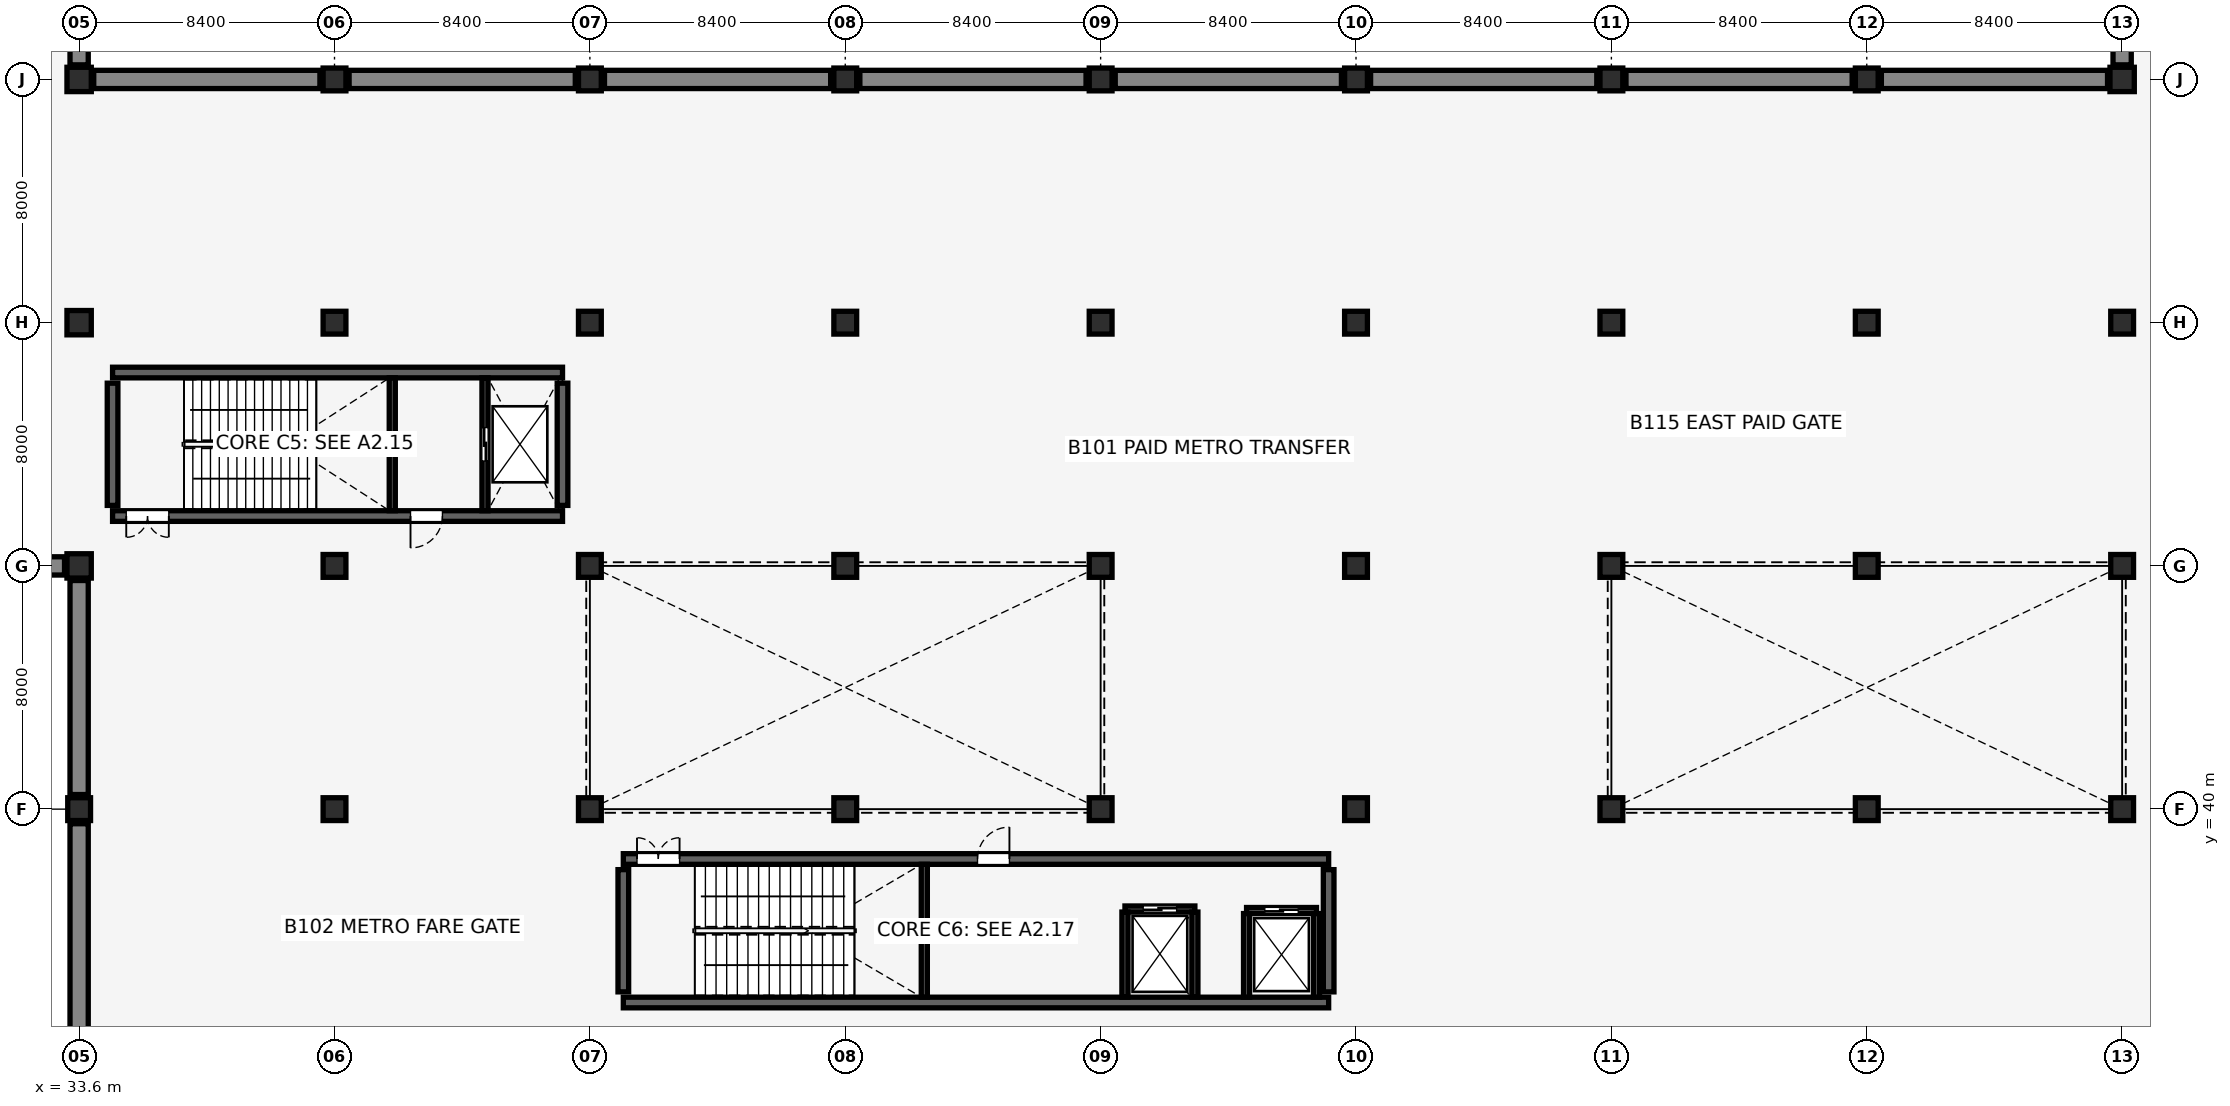
"""IFC4 building model, lengths in metres.
Left out: names, types, materials, properties, quantities, classifications, styles, units other than length and angle.
Written with IfcOpenShell. Run it as: python <this file> out.ifc"""

import sys

from ifc_helpers import new_model, si_unit, direction, frame, frame_2d, origin, origin_2d, place, context, subcontext, project, spatial, rectangle, extrude, element, fill, save


model = new_model("IFC4")
c1 = context("Model", 3, precision=1e-05, world=origin(), true_north=direction((0.0, 1.0)))
c2 = subcontext(c1, "Body", "Model", "MODEL_VIEW")
j1 = project(units=[si_unit("LENGTHUNIT", "METRE"), si_unit("PLANEANGLEUNIT", "RADIAN")], contexts=[c1])
p1 = place(None, origin())
s1 = spatial("IfcSite", under=j1, at=p1, CompositionType="ELEMENT")
p2 = place(p1, origin())
s2 = spatial("IfcBuilding", under=s1, at=p2, CompositionType="ELEMENT")
p3 = place(p2, frame((0.0, 0.0, -5.44)))
s3 = spatial("IfcBuildingStorey", under=s2, at=p3, CompositionType="ELEMENT", Elevation=-5.44)
for number, where, z_axis, x_axis in (
    (1, (33.6, 32.48, 0.0), (0.0, 0.0, 1.0), (0.0, 1.0, 0.0)),
    (2, (33.6, 40.48, 0.0), (0.0, 0.0, 1.0), (0.0, 1.0, 0.0)),
):
    element("IfcWall", number, at=place(p3, frame(where, z_axis=z_axis, x_axis=x_axis)), inside=s3, PredefinedType="SOLIDWALL", context=c2, shape_type="SweptSolid", body=[
        extrude(rectangle(XDim=7.04, YDim=0.6, at=frame_2d((3.52, 0.0))), origin(), (0.0, 0.0, 1.0), 5.02),
    ])
p4 = place(p3, frame((25.68, 48.0, 0.0), z_axis=(0.0, 0.0, 1.0), x_axis=(1.0, 0.0, 0.0)))
e3 = element("IfcWall", 3, at=p4, inside=s3, PredefinedType="SOLIDWALL", context=c2, shape_type="SweptSolid", body=[
    extrude(rectangle(XDim=7.44, YDim=0.6, at=frame_2d((3.72, 0.0))), origin(), (0.0, 0.0, 1.0), 5.02),
])
p5 = place(p3, frame((33.6, 64.48, 0.0), z_axis=(0.0, 0.0, 1.0), x_axis=(0.0, 1.0, 0.0)))
e4 = element("IfcWall", 4, at=p5, inside=s3, PredefinedType="SOLIDWALL", context=c2, shape_type="SweptSolid", body=[
    extrude(rectangle(XDim=7.04, YDim=0.6, at=frame_2d((3.52, 0.0))), origin(), (0.0, 0.0, 1.0), 5.02),
])
for number, where, z_axis, x_axis in (
    (5, (34.08, 64.0, 0.0), (0.0, 0.0, 1.0), (1.0, 0.0, 0.0)),
    (6, (42.48, 64.0, 0.0), (0.0, 0.0, 1.0), (1.0, 0.0, 0.0)),
):
    element("IfcWall", number, at=place(p3, frame(where, z_axis=z_axis, x_axis=x_axis)), inside=s3, PredefinedType="SOLIDWALL", context=c2, shape_type="SweptSolid", body=[
        extrude(rectangle(XDim=7.44, YDim=0.6, at=frame_2d((3.72, 0.0))), origin(), (0.0, 0.0, 1.0), 5.02),
    ])
p6 = place(p3, frame((50.88, 64.0, 0.0), z_axis=(0.0, 0.0, 1.0), x_axis=(1.0, 0.0, 0.0)))
e7 = element("IfcWall", 7, at=p6, inside=s3, PredefinedType="SOLIDWALL", context=c2, shape_type="SweptSolid", body=[
    extrude(rectangle(XDim=7.44, YDim=0.6, at=frame_2d((3.72, 0.0))), origin(), (0.0, 0.0, 1.0), 5.02),
])
p7 = place(p3, frame((59.28, 64.0, 0.0), z_axis=(0.0, 0.0, 1.0), x_axis=(1.0, 0.0, 0.0)))
e8 = element("IfcWall", 8, at=p7, inside=s3, PredefinedType="SOLIDWALL", context=c2, shape_type="SweptSolid", body=[
    extrude(rectangle(XDim=7.44, YDim=0.6, at=frame_2d((3.72, 0.0))), origin(), (0.0, 0.0, 1.0), 5.02),
])
p8 = place(p3, frame((67.68, 64.0, 0.0), z_axis=(0.0, 0.0, 1.0), x_axis=(1.0, 0.0, 0.0)))
e9 = element("IfcWall", 9, at=p8, inside=s3, PredefinedType="SOLIDWALL", context=c2, shape_type="SweptSolid", body=[
    extrude(rectangle(XDim=7.44, YDim=0.6, at=frame_2d((3.72, 0.0))), origin(), (0.0, 0.0, 1.0), 5.02),
])
for number, where, z_axis, x_axis in (
    (10, (76.08, 64.0, 0.0), (0.0, 0.0, 1.0), (1.0, 0.0, 0.0)),
    (11, (84.48, 64.0, 0.0), (0.0, 0.0, 1.0), (1.0, 0.0, 0.0)),
):
    element("IfcWall", number, at=place(p3, frame(where, z_axis=z_axis, x_axis=x_axis)), inside=s3, PredefinedType="SOLIDWALL", context=c2, shape_type="SweptSolid", body=[
        extrude(rectangle(XDim=7.44, YDim=0.6, at=frame_2d((3.72, 0.0))), origin(), (0.0, 0.0, 1.0), 5.02),
    ])
p9 = place(p3, frame((92.88, 64.0, 0.0), z_axis=(0.0, 0.0, 1.0), x_axis=(1.0, 0.0, 0.0)))
e12 = element("IfcWall", 12, at=p9, inside=s3, PredefinedType="SOLIDWALL", context=c2, shape_type="SweptSolid", body=[
    extrude(rectangle(XDim=7.44, YDim=0.6, at=frame_2d((3.72, 0.0))), origin(), (0.0, 0.0, 1.0), 5.02),
])
p10 = place(p3, frame((100.8, 64.48, 0.0), z_axis=(0.0, 0.0, 1.0), x_axis=(0.0, 1.0, 0.0)))
e13 = element("IfcWall", 13, at=p10, inside=s3, PredefinedType="SOLIDWALL", context=c2, shape_type="SweptSolid", body=[
    extrude(rectangle(XDim=7.04, YDim=0.6, at=frame_2d((3.52, 0.0))), origin(), (0.0, 0.0, 1.0), 5.02),
])
p11 = place(p3, frame((34.7, 49.64, 0.0), z_axis=(0.0, 0.0, 1.0), x_axis=(1.0, 0.0, 0.0)))
e14 = element("IfcWall", 14, at=p11, inside=s3, PredefinedType="SHEAR", context=c2, shape_type="SweptSolid", body=[
    extrude(rectangle(XDim=14.8, YDim=0.35, at=frame_2d((7.4, 0.0))), origin(), (0.0, 0.0, 1.0), 5.02),
])
p12 = place(p11, frame((1.85, 0.0, 0.0), z_axis=(0.0, 0.0, 1.0), x_axis=(-1.0, 0.0, 0.0)))
e15 = element("IfcOpeningElement", 15, at=p12, cuts=e14, PredefinedType="OPENING", context=c2, shape_type="SweptSolid", body=[
    extrude(rectangle(XDim=1.4, YDim=2.15, at=frame_2d((0.7, 1.075))), frame((0.0, 0.185, 0.0), z_axis=(0.0, -1.0, 0.0), x_axis=(1.0, 0.0, 0.0)), (0.0, 0.0, 1.0), 0.37),
])
p13 = place(p11, frame((10.85, 0.0, 0.0), z_axis=(0.0, 0.0, 1.0), x_axis=(-1.0, 0.0, 0.0)))
e16 = element("IfcOpeningElement", 16, at=p13, cuts=e14, PredefinedType="OPENING", context=c2, shape_type="SweptSolid", body=[
    extrude(rectangle(XDim=1.05, YDim=2.15, at=frame_2d((0.525, 1.075))), frame((0.0, 0.185, 0.0), z_axis=(0.0, -1.0, 0.0), x_axis=(1.0, 0.0, 0.0)), (0.0, 0.0, 1.0), 0.37),
])
p14 = place(p3, frame((34.7, 54.36, 0.0), z_axis=(0.0, 0.0, 1.0), x_axis=(1.0, 0.0, 0.0)))
e17 = element("IfcWall", 17, at=p14, inside=s3, PredefinedType="SHEAR", context=c2, shape_type="SweptSolid", body=[
    extrude(rectangle(XDim=14.8, YDim=0.35, at=frame_2d((7.4, 0.0))), origin(), (0.0, 0.0, 1.0), 5.02),
])
for number, where, z_axis, x_axis in (
    (18, (34.7, 49.99, 0.0), (0.0, 0.0, 1.0), (0.0, 1.0, 0.0)),
    (19, (49.5, 49.99, 0.0), (0.0, 0.0, 1.0), (0.0, 1.0, 0.0)),
):
    element("IfcWall", number, at=place(p3, frame(where, z_axis=z_axis, x_axis=x_axis)), inside=s3, PredefinedType="SHEAR", context=c2, shape_type="SweptSolid", body=[
        extrude(rectangle(XDim=4.02, YDim=0.35, at=frame_2d((2.01, 0.0))), origin(), (0.0, 0.0, 1.0), 5.02),
    ])
p15 = place(p3, frame((51.5, 33.64, 0.0), z_axis=(0.0, 0.0, 1.0), x_axis=(1.0, 0.0, 0.0)))
e20 = element("IfcWall", 20, at=p15, inside=s3, PredefinedType="SHEAR", context=c2, shape_type="SweptSolid", body=[
    extrude(rectangle(XDim=23.2, YDim=0.35, at=frame_2d((11.6, 0.0))), origin(), (0.0, 0.0, 1.0), 5.02),
])
p16 = place(p3, frame((51.5, 38.36, 0.0), z_axis=(0.0, 0.0, 1.0), x_axis=(1.0, 0.0, 0.0)))
e21 = element("IfcWall", 21, at=p16, inside=s3, PredefinedType="SHEAR", context=c2, shape_type="SweptSolid", body=[
    extrude(rectangle(XDim=23.2, YDim=0.35, at=frame_2d((11.6, 0.0))), origin(), (0.0, 0.0, 1.0), 5.02),
])
p17 = place(p16, frame((0.45, 0.0, 0.0), z_axis=(0.0, 0.0, 1.0), x_axis=(1.0, 0.0, 0.0)))
e22 = element("IfcOpeningElement", 22, at=p17, cuts=e21, PredefinedType="OPENING", context=c2, shape_type="SweptSolid", body=[
    extrude(rectangle(XDim=1.4, YDim=2.15, at=frame_2d((0.7, 1.075))), frame((0.0, 0.185, 0.0), z_axis=(0.0, -1.0, 0.0), x_axis=(1.0, 0.0, 0.0)), (0.0, 0.0, 1.0), 0.37),
])
p18 = place(p16, frame((11.65, 0.0, 0.0), z_axis=(0.0, 0.0, 1.0), x_axis=(1.0, 0.0, 0.0)))
e23 = element("IfcOpeningElement", 23, at=p18, cuts=e21, PredefinedType="OPENING", context=c2, shape_type="SweptSolid", body=[
    extrude(rectangle(XDim=1.05, YDim=2.15, at=frame_2d((0.525, 1.075))), frame((0.0, 0.185, 0.0), z_axis=(0.0, -1.0, 0.0), x_axis=(1.0, 0.0, 0.0)), (0.0, 0.0, 1.0), 0.37),
])
for number, where, z_axis, x_axis in (
    (24, (51.5, 33.99, 0.0), (0.0, 0.0, 1.0), (0.0, 1.0, 0.0)),
    (25, (74.7, 33.99, 0.0), (0.0, 0.0, 1.0), (0.0, 1.0, 0.0)),
):
    element("IfcWall", number, at=place(p3, frame(where, z_axis=z_axis, x_axis=x_axis)), inside=s3, PredefinedType="SHEAR", context=c2, shape_type="SweptSolid", body=[
        extrude(rectangle(XDim=4.02, YDim=0.35, at=frame_2d((2.01, 0.0))), origin(), (0.0, 0.0, 1.0), 5.02),
    ])
p19 = place(p3, frame((33.6, 40.0, 0.0), z_axis=(0.0, 0.0, 1.0), x_axis=(1.0, 0.0, 0.0)))
e26 = element("IfcColumn", 26, at=p19, inside=s3, PredefinedType="COLUMN", context=c2, shape_type="SweptSolid", body=[
    extrude(rectangle(XDim=0.75, YDim=0.75, at=origin_2d()), origin(), (0.0, 0.0, 1.0), 5.02),
])
for number, where, z_axis, x_axis in (
    (27, (33.6, 48.0, 0.0), (0.0, 0.0, 1.0), (1.0, 0.0, 0.0)),
    (28, (33.6, 56.0, 0.0), (0.0, 0.0, 1.0), (1.0, 0.0, 0.0)),
    (29, (33.6, 64.0, 0.0), (0.0, 0.0, 1.0), (1.0, 0.0, 0.0)),
):
    element("IfcColumn", number, at=place(p3, frame(where, z_axis=z_axis, x_axis=x_axis)), inside=s3, PredefinedType="COLUMN", context=c2, shape_type="SweptSolid", body=[
        extrude(rectangle(XDim=0.8, YDim=0.8, at=origin_2d()), origin(), (0.0, 0.0, 1.0), 5.02),
    ])
for number, where, z_axis, x_axis in (
    (30, (42.0, 40.0, 0.0), (0.0, 0.0, 1.0), (1.0, 0.0, 0.0)),
    (31, (42.0, 48.0, 0.0), (0.0, 0.0, 1.0), (1.0, 0.0, 0.0)),
    (32, (42.0, 56.0, 0.0), (0.0, 0.0, 1.0), (1.0, 0.0, 0.0)),
    (33, (42.0, 64.0, 0.0), (0.0, 0.0, 1.0), (1.0, 0.0, 0.0)),
    (34, (50.4, 40.0, 0.0), (0.0, 0.0, 1.0), (1.0, 0.0, 0.0)),
    (35, (50.4, 48.0, 0.0), (0.0, 0.0, 1.0), (1.0, 0.0, 0.0)),
    (36, (50.4, 56.0, 0.0), (0.0, 0.0, 1.0), (1.0, 0.0, 0.0)),
    (37, (50.4, 64.0, 0.0), (0.0, 0.0, 1.0), (1.0, 0.0, 0.0)),
    (38, (58.8, 40.0, 0.0), (0.0, 0.0, 1.0), (1.0, 0.0, 0.0)),
    (39, (58.8, 48.0, 0.0), (0.0, 0.0, 1.0), (1.0, 0.0, 0.0)),
    (40, (58.8, 56.0, 0.0), (0.0, 0.0, 1.0), (1.0, 0.0, 0.0)),
    (41, (58.8, 64.0, 0.0), (0.0, 0.0, 1.0), (1.0, 0.0, 0.0)),
    (42, (67.2, 40.0, 0.0), (0.0, 0.0, 1.0), (1.0, 0.0, 0.0)),
    (43, (67.2, 48.0, 0.0), (0.0, 0.0, 1.0), (1.0, 0.0, 0.0)),
    (44, (67.2, 56.0, 0.0), (0.0, 0.0, 1.0), (1.0, 0.0, 0.0)),
    (45, (67.2, 64.0, 0.0), (0.0, 0.0, 1.0), (1.0, 0.0, 0.0)),
    (46, (75.6, 40.0, 0.0), (0.0, 0.0, 1.0), (1.0, 0.0, 0.0)),
    (47, (75.6, 48.0, 0.0), (0.0, 0.0, 1.0), (1.0, 0.0, 0.0)),
    (48, (75.6, 56.0, 0.0), (0.0, 0.0, 1.0), (1.0, 0.0, 0.0)),
    (49, (75.6, 64.0, 0.0), (0.0, 0.0, 1.0), (1.0, 0.0, 0.0)),
    (50, (84.0, 40.0, 0.0), (0.0, 0.0, 1.0), (1.0, 0.0, 0.0)),
    (51, (84.0, 48.0, 0.0), (0.0, 0.0, 1.0), (1.0, 0.0, 0.0)),
    (52, (84.0, 56.0, 0.0), (0.0, 0.0, 1.0), (1.0, 0.0, 0.0)),
    (53, (84.0, 64.0, 0.0), (0.0, 0.0, 1.0), (1.0, 0.0, 0.0)),
    (54, (92.4, 40.0, 0.0), (0.0, 0.0, 1.0), (1.0, 0.0, 0.0)),
    (55, (92.4, 48.0, 0.0), (0.0, 0.0, 1.0), (1.0, 0.0, 0.0)),
    (56, (92.4, 56.0, 0.0), (0.0, 0.0, 1.0), (1.0, 0.0, 0.0)),
    (57, (92.4, 64.0, 0.0), (0.0, 0.0, 1.0), (1.0, 0.0, 0.0)),
    (58, (100.8, 40.0, 0.0), (0.0, 0.0, 1.0), (1.0, 0.0, 0.0)),
    (59, (100.8, 48.0, 0.0), (0.0, 0.0, 1.0), (1.0, 0.0, 0.0)),
    (60, (100.8, 56.0, 0.0), (0.0, 0.0, 1.0), (1.0, 0.0, 0.0)),
):
    element("IfcColumn", number, at=place(p3, frame(where, z_axis=z_axis, x_axis=x_axis)), inside=s3, PredefinedType="COLUMN", context=c2, shape_type="SweptSolid", body=[
        extrude(rectangle(XDim=0.75, YDim=0.75, at=origin_2d()), origin(), (0.0, 0.0, 1.0), 5.02),
    ])
p20 = place(p3, frame((100.8, 64.0, 0.0), z_axis=(0.0, 0.0, 1.0), x_axis=(1.0, 0.0, 0.0)))
e61 = element("IfcColumn", 61, at=p20, inside=s3, PredefinedType="COLUMN", context=c2, shape_type="SweptSolid", body=[
    extrude(rectangle(XDim=0.8, YDim=0.8, at=origin_2d()), origin(), (0.0, 0.0, 1.0), 5.02),
])
p21 = place(p3, frame((43.9, 49.815, 0.0), z_axis=(0.0, 0.0, 1.0), x_axis=(0.0, 1.0, 0.0)))
e62 = element("IfcWall", 62, at=p21, inside=s3, PredefinedType="SHEAR", context=c2, shape_type="SweptSolid", body=[
    extrude(rectangle(XDim=4.37, YDim=0.2, at=frame_2d((2.185, 0.0))), origin(), (0.0, 0.0, 1.0), 5.02),
])
p22 = place(p3, frame((46.95, 49.815, 0.0), z_axis=(0.0, 0.0, 1.0), x_axis=(0.0, 1.0, 0.0)))
e63 = element("IfcWall", 63, at=p22, inside=s3, PredefinedType="SHEAR", context=c2, shape_type="SweptSolid", body=[
    extrude(rectangle(XDim=4.37, YDim=0.2, at=frame_2d((2.185, 0.0))), origin(), (0.0, 0.0, 1.0), 5.02),
])
p23 = place(p22, frame((1.635, 0.0, 0.0), z_axis=(0.0, 0.0, 1.0), x_axis=(1.0, 0.0, 0.0)))
e64 = element("IfcOpeningElement", 64, at=p23, cuts=e63, PredefinedType="OPENING", context=c2, shape_type="SweptSolid", body=[
    extrude(rectangle(XDim=1.1, YDim=2.15, at=frame_2d((0.55, 1.075))), frame((0.0, 0.11, 0.0), z_axis=(0.0, -1.0, 0.0), x_axis=(1.0, 0.0, 0.0)), (0.0, 0.0, 1.0), 0.22),
])
p24 = place(p3, frame((61.4, 33.815, 0.0), z_axis=(0.0, 0.0, 1.0), x_axis=(0.0, 1.0, 0.0)))
e65 = element("IfcWall", 65, at=p24, inside=s3, PredefinedType="SHEAR", context=c2, shape_type="SweptSolid", body=[
    extrude(rectangle(XDim=4.37, YDim=0.2, at=frame_2d((2.185, 0.0))), origin(), (0.0, 0.0, 1.0), 5.02),
])
p25 = place(p3, frame((68.0, 36.715, 0.0), z_axis=(0.0, 0.0, 1.0), x_axis=(1.0, 0.0, 0.0)))
e66 = element("IfcWall", 66, at=p25, inside=s3, PredefinedType="SHEAR", context=c2, shape_type="SweptSolid", body=[
    extrude(rectangle(XDim=2.3, YDim=0.2, at=frame_2d((1.15, 0.0))), origin(), (0.0, 0.0, 1.0), 5.02),
])
p26 = place(p25, frame((0.6, 0.0, 0.0), z_axis=(0.0, 0.0, 1.0), x_axis=(1.0, 0.0, 0.0)))
e67 = element("IfcOpeningElement", 67, at=p26, cuts=e66, PredefinedType="OPENING", context=c2, shape_type="SweptSolid", body=[
    extrude(rectangle(XDim=1.1, YDim=2.15, at=frame_2d((0.55, 1.075))), frame((0.0, 0.11, 0.0), z_axis=(0.0, -1.0, 0.0), x_axis=(1.0, 0.0, 0.0)), (0.0, 0.0, 1.0), 0.22),
])
for number, where, z_axis, x_axis in (
    (68, (68.0, 33.815, 0.0), (0.0, 0.0, 1.0), (0.0, 1.0, 0.0)),
    (69, (70.3, 33.815, 0.0), (0.0, 0.0, 1.0), (0.0, 1.0, 0.0)),
):
    element("IfcWall", number, at=place(p3, frame(where, z_axis=z_axis, x_axis=x_axis)), inside=s3, PredefinedType="SHEAR", context=c2, shape_type="SweptSolid", body=[
        extrude(rectangle(XDim=2.8, YDim=0.2, at=frame_2d((1.4, 0.0))), origin(), (0.0, 0.0, 1.0), 5.02),
    ])
p27 = place(p3, frame((72.0, 36.665, 0.0), z_axis=(0.0, 0.0, 1.0), x_axis=(1.0, 0.0, 0.0)))
e70 = element("IfcWall", 70, at=p27, inside=s3, PredefinedType="SHEAR", context=c2, shape_type="SweptSolid", body=[
    extrude(rectangle(XDim=2.3, YDim=0.2, at=frame_2d((1.15, 0.0))), origin(), (0.0, 0.0, 1.0), 5.02),
])
p28 = place(p27, frame((0.6, 0.0, 0.0), z_axis=(0.0, 0.0, 1.0), x_axis=(1.0, 0.0, 0.0)))
e71 = element("IfcOpeningElement", 71, at=p28, cuts=e70, PredefinedType="OPENING", context=c2, shape_type="SweptSolid", body=[
    extrude(rectangle(XDim=1.1, YDim=2.15, at=frame_2d((0.55, 1.075))), frame((0.0, 0.11, 0.0), z_axis=(0.0, -1.0, 0.0), x_axis=(1.0, 0.0, 0.0)), (0.0, 0.0, 1.0), 0.22),
])
for number, where, z_axis, x_axis in (
    (72, (72.0, 33.815, 0.0), (0.0, 0.0, 1.0), (0.0, 1.0, 0.0)),
    (73, (74.3, 33.815, 0.0), (0.0, 0.0, 1.0), (0.0, 1.0, 0.0)),
):
    element("IfcWall", number, at=place(p3, frame(where, z_axis=z_axis, x_axis=x_axis)), inside=s3, PredefinedType="SHEAR", context=c2, shape_type="SweptSolid", body=[
        extrude(rectangle(XDim=2.75, YDim=0.2, at=frame_2d((1.375, 0.0))), origin(), (0.0, 0.0, 1.0), 5.02),
    ])
p29 = place(p12, origin())
e74 = element("IfcDoor", 74, at=p29, inside=s3, OperationType="DOUBLE_DOOR_SINGLE_SWING", PredefinedType="DOOR", context=c2, shape_type="SweptSolid", body=[
    extrude(rectangle(XDim=1.4, YDim=2.15, at=frame_2d((0.7, 1.075))), frame((0.0, 0.025, 0.0), z_axis=(0.0, -1.0, 0.0), x_axis=(1.0, 0.0, 0.0)), (0.0, 0.0, 1.0), 0.05),
])
fill(e15, e74)
p30 = place(p13, origin())
e75 = element("IfcDoor", 75, at=p30, inside=s3, OperationType="SINGLE_SWING_RIGHT", PredefinedType="DOOR", context=c2, shape_type="SweptSolid", body=[
    extrude(rectangle(XDim=1.05, YDim=2.15, at=frame_2d((0.525, 1.075))), frame((0.0, 0.025, 0.0), z_axis=(0.0, -1.0, 0.0), x_axis=(1.0, 0.0, 0.0)), (0.0, 0.0, 1.0), 0.05),
])
fill(e16, e75)
p31 = place(p23, origin())
e76 = element("IfcDoor", 76, at=p31, inside=s3, OperationType="DOUBLE_DOOR_SLIDING", PredefinedType="DOOR", context=c2, shape_type="SweptSolid", body=[
    extrude(rectangle(XDim=1.1, YDim=2.15, at=frame_2d((0.55, 1.075))), frame((0.0, 0.025, 0.0), z_axis=(0.0, -1.0, 0.0), x_axis=(1.0, 0.0, 0.0)), (0.0, 0.0, 1.0), 0.05),
])
fill(e64, e76)
p32 = place(p17, origin())
e77 = element("IfcDoor", 77, at=p32, inside=s3, OperationType="DOUBLE_DOOR_SINGLE_SWING", PredefinedType="DOOR", context=c2, shape_type="SweptSolid", body=[
    extrude(rectangle(XDim=1.4, YDim=2.15, at=frame_2d((0.7, 1.075))), frame((0.0, 0.025, 0.0), z_axis=(0.0, -1.0, 0.0), x_axis=(1.0, 0.0, 0.0)), (0.0, 0.0, 1.0), 0.05),
])
fill(e22, e77)
p33 = place(p18, origin())
e78 = element("IfcDoor", 78, at=p33, inside=s3, OperationType="SINGLE_SWING_RIGHT", PredefinedType="DOOR", context=c2, shape_type="SweptSolid", body=[
    extrude(rectangle(XDim=1.05, YDim=2.15, at=frame_2d((0.525, 1.075))), frame((0.0, 0.025, 0.0), z_axis=(0.0, -1.0, 0.0), x_axis=(1.0, 0.0, 0.0)), (0.0, 0.0, 1.0), 0.05),
])
fill(e23, e78)
p34 = place(p26, origin())
e79 = element("IfcDoor", 79, at=p34, inside=s3, OperationType="DOUBLE_DOOR_SLIDING", PredefinedType="DOOR", context=c2, shape_type="SweptSolid", body=[
    extrude(rectangle(XDim=1.1, YDim=2.15, at=frame_2d((0.55, 1.075))), frame((0.0, 0.025, 0.0), z_axis=(0.0, -1.0, 0.0), x_axis=(1.0, 0.0, 0.0)), (0.0, 0.0, 1.0), 0.05),
])
fill(e67, e79)
p35 = place(p28, origin())
e80 = element("IfcDoor", 80, at=p35, inside=s3, OperationType="DOUBLE_DOOR_SLIDING", PredefinedType="DOOR", context=c2, shape_type="SweptSolid", body=[
    extrude(rectangle(XDim=1.1, YDim=2.15, at=frame_2d((0.55, 1.075))), frame((0.0, 0.025, 0.0), z_axis=(0.0, -1.0, 0.0), x_axis=(1.0, 0.0, 0.0)), (0.0, 0.0, 1.0), 0.05),
])
fill(e71, e80)
save(model, sys.argv[1])
